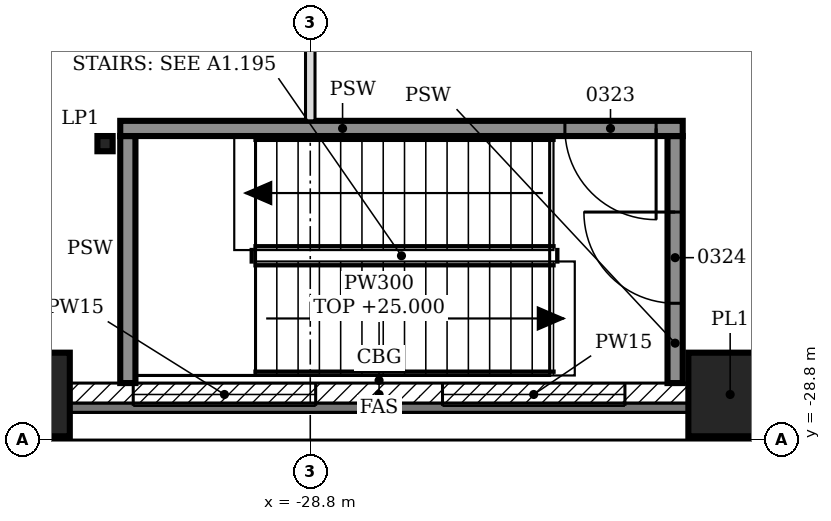
"""IFC4 building model, lengths in metres.
Left out: names, types, materials, properties, quantities, classifications, styles, units other than length and angle.
Written with IfcOpenShell. Run it as: python <this file> out.ifc"""

import sys

from ifc_helpers import new_model, si_unit, direction, frame, frame_2d, origin, origin_2d, place, context, subcontext, project, spatial, polyline, rectangle, hollow_rectangle, i_section, outline, extrude, element, fill, save


model = new_model("IFC4")
c1 = context("Model", 3, precision=1e-05, world=origin(), true_north=direction((0.0, 1.0)))
c2 = subcontext(c1, "Body", "Model", "MODEL_VIEW")
j1 = project(units=[si_unit("LENGTHUNIT", "METRE"), si_unit("PLANEANGLEUNIT", "RADIAN")], contexts=[c1])
p1 = place(None, origin())
s1 = spatial("IfcSite", under=j1, at=p1, CompositionType="ELEMENT")
p2 = place(p1, origin())
s2 = spatial("IfcBuilding", under=s1, at=p2, CompositionType="ELEMENT")
p3 = place(p2, frame((0.0, 0.0, 21.0)))
s3 = spatial("IfcBuildingStorey", under=s2, at=p3, CompositionType="ELEMENT", Elevation=21.0)
for number, where, z_axis, x_axis in (
    (1, (-32.514, -28.2, 0.0), (0.0, 0.0, 1.0), (1.0, 0.0, 0.0)),
    (2, (-23.276, -28.2, 0.0), (0.0, 0.0, 1.0), (1.0, 0.0, 0.0)),
):
    element("IfcColumn", number, at=place(p3, frame(where, z_axis=z_axis, x_axis=x_axis)), inside=s3, PredefinedType="COLUMN", context=c2, shape_type="SweptSolid", body=[
        extrude(hollow_rectangle(XDim=1.1, YDim=1.1, WallThickness=0.06, at=origin_2d()), origin(), (0.0, 0.0, 1.0), 4.8),
    ])
p4 = place(p3, frame((-31.5, -24.9, 0.0), z_axis=(0.0, 0.0, 1.0), x_axis=(1.0, 0.0, 0.0)))
e3 = element("IfcColumn", 3, at=p4, inside=s3, PredefinedType="COLUMN", context=c2, shape_type="SweptSolid", body=[
    extrude(i_section(OverallWidth=0.2, OverallDepth=0.2, WebThickness=0.009, FlangeThickness=0.015, FilletRadius=0.018, at=origin_2d()), origin(), (0.0, 0.0, 1.0), 4.8),
])
p5 = place(p3, frame((-31.964, -28.2, 0.0), z_axis=(0.0, 0.0, 1.0), x_axis=(1.0, 0.0, 0.0)))
e4 = element("IfcWall", 4, at=p5, inside=s3, PredefinedType="SOLIDWALL", context=c2, shape_type="SweptSolid", body=[
    extrude(rectangle(XDim=8.138, YDim=0.3, at=frame_2d((4.069, 0.0))), origin(), (0.0, 0.0, 1.0), 4.0),
])
p6 = place(p5, frame((0.834, 0.0, 0.9)))
e5 = element("IfcOpeningElement", 5, at=p6, cuts=e4, PredefinedType="OPENING", context=c2, shape_type="SweptSolid", body=[
    extrude(rectangle(XDim=2.4, YDim=1.5, at=frame_2d((1.2, 0.75))), frame((0.0, 0.16, 0.0), z_axis=(0.0, -1.0, 0.0), x_axis=(1.0, 0.0, 0.0)), (0.0, 0.0, 1.0), 0.32),
])
p7 = place(p5, frame((4.903, 0.0, 0.9)))
e6 = element("IfcOpeningElement", 6, at=p7, cuts=e4, PredefinedType="OPENING", context=c2, shape_type="SweptSolid", body=[
    extrude(rectangle(XDim=2.4, YDim=1.5, at=frame_2d((1.2, 0.75))), frame((0.0, 0.16, 0.0), z_axis=(0.0, -1.0, 0.0), x_axis=(1.0, 0.0, 0.0)), (0.0, 0.0, 1.0), 0.32),
])
p8 = place(p3, frame((-31.2, -28.05, 0.0), z_axis=(0.0, 0.0, 1.0), x_axis=(0.0, 1.0, 0.0)))
e7 = element("IfcWall", 7, at=p8, inside=s3, PredefinedType="SOLIDWALL", context=c2, shape_type="SweptSolid", body=[
    extrude(rectangle(XDim=3.25, YDim=0.2, at=frame_2d((1.625, 0.0))), origin(), (0.0, 0.0, 1.0), 4.6),
])
p9 = place(p3, frame((-24.0, -28.05, 0.0), z_axis=(0.0, 0.0, 1.0), x_axis=(0.0, 1.0, 0.0)))
e8 = element("IfcWall", 8, at=p9, inside=s3, PredefinedType="SOLIDWALL", context=c2, shape_type="SweptSolid", body=[
    extrude(rectangle(XDim=3.25, YDim=0.2, at=frame_2d((1.625, 0.0))), origin(), (0.0, 0.0, 1.0), 4.6),
])
p10 = place(p9, frame((1.05, 0.0, 0.0)))
e9 = element("IfcOpeningElement", 9, at=p10, cuts=e8, PredefinedType="OPENING", context=c2, shape_type="SweptSolid", body=[
    extrude(rectangle(XDim=1.2, YDim=2.1, at=frame_2d((0.6, 1.05))), frame((0.0, 0.11, 0.0), z_axis=(0.0, -1.0, 0.0), x_axis=(1.0, 0.0, 0.0)), (0.0, 0.0, 1.0), 0.22),
])
p11 = place(p3, frame((-31.3, -24.7, 0.0), z_axis=(0.0, 0.0, 1.0), x_axis=(1.0, 0.0, 0.0)))
e10 = element("IfcWall", 10, at=p11, inside=s3, PredefinedType="SOLIDWALL", context=c2, shape_type="SweptSolid", body=[
    extrude(rectangle(XDim=7.4, YDim=0.2, at=frame_2d((3.7, 0.0))), origin(), (0.0, 0.0, 1.0), 4.6),
])
p12 = place(p11, frame((5.85, 0.0, 0.0)))
e11 = element("IfcOpeningElement", 11, at=p12, cuts=e10, PredefinedType="OPENING", context=c2, shape_type="SweptSolid", body=[
    extrude(rectangle(XDim=1.2, YDim=2.1, at=frame_2d((0.6, 1.05))), frame((0.0, 0.11, 0.0), z_axis=(0.0, -1.0, 0.0), x_axis=(1.0, 0.0, 0.0)), (0.0, 0.0, 1.0), 0.22),
])
p13 = place(p3, frame((-28.8, -24.6, 0.0), z_axis=(0.0, 0.0, 1.0), x_axis=(0.0, 1.0, 0.0)))
e12 = element("IfcWall", 12, at=p13, inside=s3, PredefinedType="PARTITIONING", context=c2, shape_type="SweptSolid", body=[
    extrude(outline(polyline([(0.0, 0.0), (49.2, 0.0), (49.2, 4.6), (43.95, 4.6), (43.948, 3.98), (43.65, 3.98), (43.648, 4.6), (39.15, 4.6), (39.148, 3.98), (38.85, 3.98), (38.848, 4.6), (34.35, 4.6), (34.348, 3.98), (34.05, 3.98), (34.048, 4.6), (29.55, 4.6), (29.548, 3.98), (29.25, 3.98), (29.248, 4.6), (24.75, 4.6), (24.748, 3.98), (24.45, 3.98), (24.448, 4.6), (19.95, 4.6), (19.948, 3.98), (19.65, 3.98), (19.648, 4.6), (15.15, 4.6), (15.148, 3.98), (14.85, 3.98), (14.848, 4.6), (10.35, 4.6), (10.348, 3.98), (10.05, 3.98), (10.048, 4.6), (5.55, 4.6), (5.548, 3.98), (5.25, 3.98), (5.248, 4.6), (0.0, 4.6), (0.0, 0.0)])), frame((0.0, 0.062, 0.0), z_axis=(0.0, -1.0, 0.0), x_axis=(1.0, 0.0, 0.0)), (0.0, 0.0, 1.0), 0.125),
])
p14 = place(p13, frame((1.7, 0.0, 0.0)))
e13 = element("IfcOpeningElement", 13, at=p14, cuts=e12, PredefinedType="OPENING", context=c2, shape_type="SweptSolid", body=[
    extrude(rectangle(XDim=1.8, YDim=2.1, at=frame_2d((0.9, 1.05))), frame((0.0, 0.073, 0.0), z_axis=(0.0, -1.0, 0.0), x_axis=(1.0, 0.0, 0.0)), (0.0, 0.0, 1.0), 0.145),
])
p15 = place(p13, frame((8.05, 0.0, 0.0)))
e14 = element("IfcOpeningElement", 14, at=p15, cuts=e12, PredefinedType="OPENING", context=c2, shape_type="SweptSolid", body=[
    extrude(rectangle(XDim=1.8, YDim=2.1, at=frame_2d((0.9, 1.05))), frame((0.0, 0.073, 0.0), z_axis=(0.0, -1.0, 0.0), x_axis=(1.0, 0.0, 0.0)), (0.0, 0.0, 1.0), 0.145),
])
p16 = place(p13, frame((14.7, 0.0, 0.0)))
e15 = element("IfcOpeningElement", 15, at=p16, cuts=e12, PredefinedType="OPENING", context=c2, shape_type="SweptSolid", body=[
    extrude(rectangle(XDim=1.8, YDim=2.1, at=frame_2d((0.9, 1.05))), frame((0.0, 0.073, 0.0), z_axis=(0.0, -1.0, 0.0), x_axis=(1.0, 0.0, 0.0)), (0.0, 0.0, 1.0), 0.145),
])
p17 = place(p13, frame((21.2, 0.0, 0.0)))
e16 = element("IfcOpeningElement", 16, at=p17, cuts=e12, PredefinedType="OPENING", context=c2, shape_type="SweptSolid", body=[
    extrude(rectangle(XDim=1.8, YDim=2.1, at=frame_2d((0.9, 1.05))), frame((0.0, 0.073, 0.0), z_axis=(0.0, -1.0, 0.0), x_axis=(1.0, 0.0, 0.0)), (0.0, 0.0, 1.0), 0.145),
])
p18 = place(p13, frame((26.2, 0.0, 0.0)))
e17 = element("IfcOpeningElement", 17, at=p18, cuts=e12, PredefinedType="OPENING", context=c2, shape_type="SweptSolid", body=[
    extrude(rectangle(XDim=1.8, YDim=2.1, at=frame_2d((0.9, 1.05))), frame((0.0, 0.073, 0.0), z_axis=(0.0, -1.0, 0.0), x_axis=(1.0, 0.0, 0.0)), (0.0, 0.0, 1.0), 0.145),
])
p19 = place(p13, frame((32.7, 0.0, 0.0)))
e18 = element("IfcOpeningElement", 18, at=p19, cuts=e12, PredefinedType="OPENING", context=c2, shape_type="SweptSolid", body=[
    extrude(rectangle(XDim=1.8, YDim=2.1, at=frame_2d((0.9, 1.05))), frame((0.0, 0.073, 0.0), z_axis=(0.0, -1.0, 0.0), x_axis=(1.0, 0.0, 0.0)), (0.0, 0.0, 1.0), 0.145),
])
p20 = place(p13, frame((39.35, 0.0, 0.0)))
e19 = element("IfcOpeningElement", 19, at=p20, cuts=e12, PredefinedType="OPENING", context=c2, shape_type="SweptSolid", body=[
    extrude(rectangle(XDim=1.8, YDim=2.1, at=frame_2d((0.9, 1.05))), frame((0.0, 0.073, 0.0), z_axis=(0.0, -1.0, 0.0), x_axis=(1.0, 0.0, 0.0)), (0.0, 0.0, 1.0), 0.145),
])
p21 = place(p13, frame((45.7, 0.0, 0.0)))
e20 = element("IfcOpeningElement", 20, at=p21, cuts=e12, PredefinedType="OPENING", context=c2, shape_type="SweptSolid", body=[
    extrude(rectangle(XDim=1.8, YDim=2.1, at=frame_2d((0.9, 1.05))), frame((0.0, 0.073, 0.0), z_axis=(0.0, -1.0, 0.0), x_axis=(1.0, 0.0, 0.0)), (0.0, 0.0, 1.0), 0.145),
])
p22 = place(p6, origin())
e21 = element("IfcWindow", 21, at=p22, inside=s3, PartitioningType="SINGLE_PANEL", PredefinedType="WINDOW", context=c2, shape_type="SweptSolid", body=[
    extrude(rectangle(XDim=2.4, YDim=1.5, at=frame_2d((1.2, 0.75))), frame((0.0, 0.03, 0.0), z_axis=(0.0, -1.0, 0.0), x_axis=(1.0, 0.0, 0.0)), (0.0, 0.0, 1.0), 0.06),
])
fill(e5, e21)
p23 = place(p7, origin())
e22 = element("IfcWindow", 22, at=p23, inside=s3, PartitioningType="SINGLE_PANEL", PredefinedType="WINDOW", context=c2, shape_type="SweptSolid", body=[
    extrude(rectangle(XDim=2.4, YDim=1.5, at=frame_2d((1.2, 0.75))), frame((0.0, 0.03, 0.0), z_axis=(0.0, -1.0, 0.0), x_axis=(1.0, 0.0, 0.0)), (0.0, 0.0, 1.0), 0.06),
])
fill(e6, e22)
p24 = place(p12, frame((1.2, 0.0, 0.0), z_axis=(0.0, 0.0, 1.0), x_axis=(-1.0, 0.0, 0.0)))
e23 = element("IfcDoor", 23, at=p24, inside=s3, OperationType="SINGLE_SWING_LEFT", PredefinedType="DOOR", context=c2, shape_type="SweptSolid", body=[
    extrude(rectangle(XDim=1.2, YDim=2.1, at=frame_2d((0.6, 1.05))), frame((0.0, 0.025, 0.0), z_axis=(0.0, -1.0, 0.0), x_axis=(1.0, 0.0, 0.0)), (0.0, 0.0, 1.0), 0.05),
])
fill(e11, e23)
p25 = place(p10, origin())
e24 = element("IfcDoor", 24, at=p25, inside=s3, OperationType="SINGLE_SWING_RIGHT", PredefinedType="DOOR", context=c2, shape_type="SweptSolid", body=[
    extrude(rectangle(XDim=1.2, YDim=2.1, at=frame_2d((0.6, 1.05))), frame((0.0, 0.025, 0.0), z_axis=(0.0, -1.0, 0.0), x_axis=(1.0, 0.0, 0.0)), (0.0, 0.0, 1.0), 0.05),
])
fill(e9, e24)
save(model, sys.argv[1])
